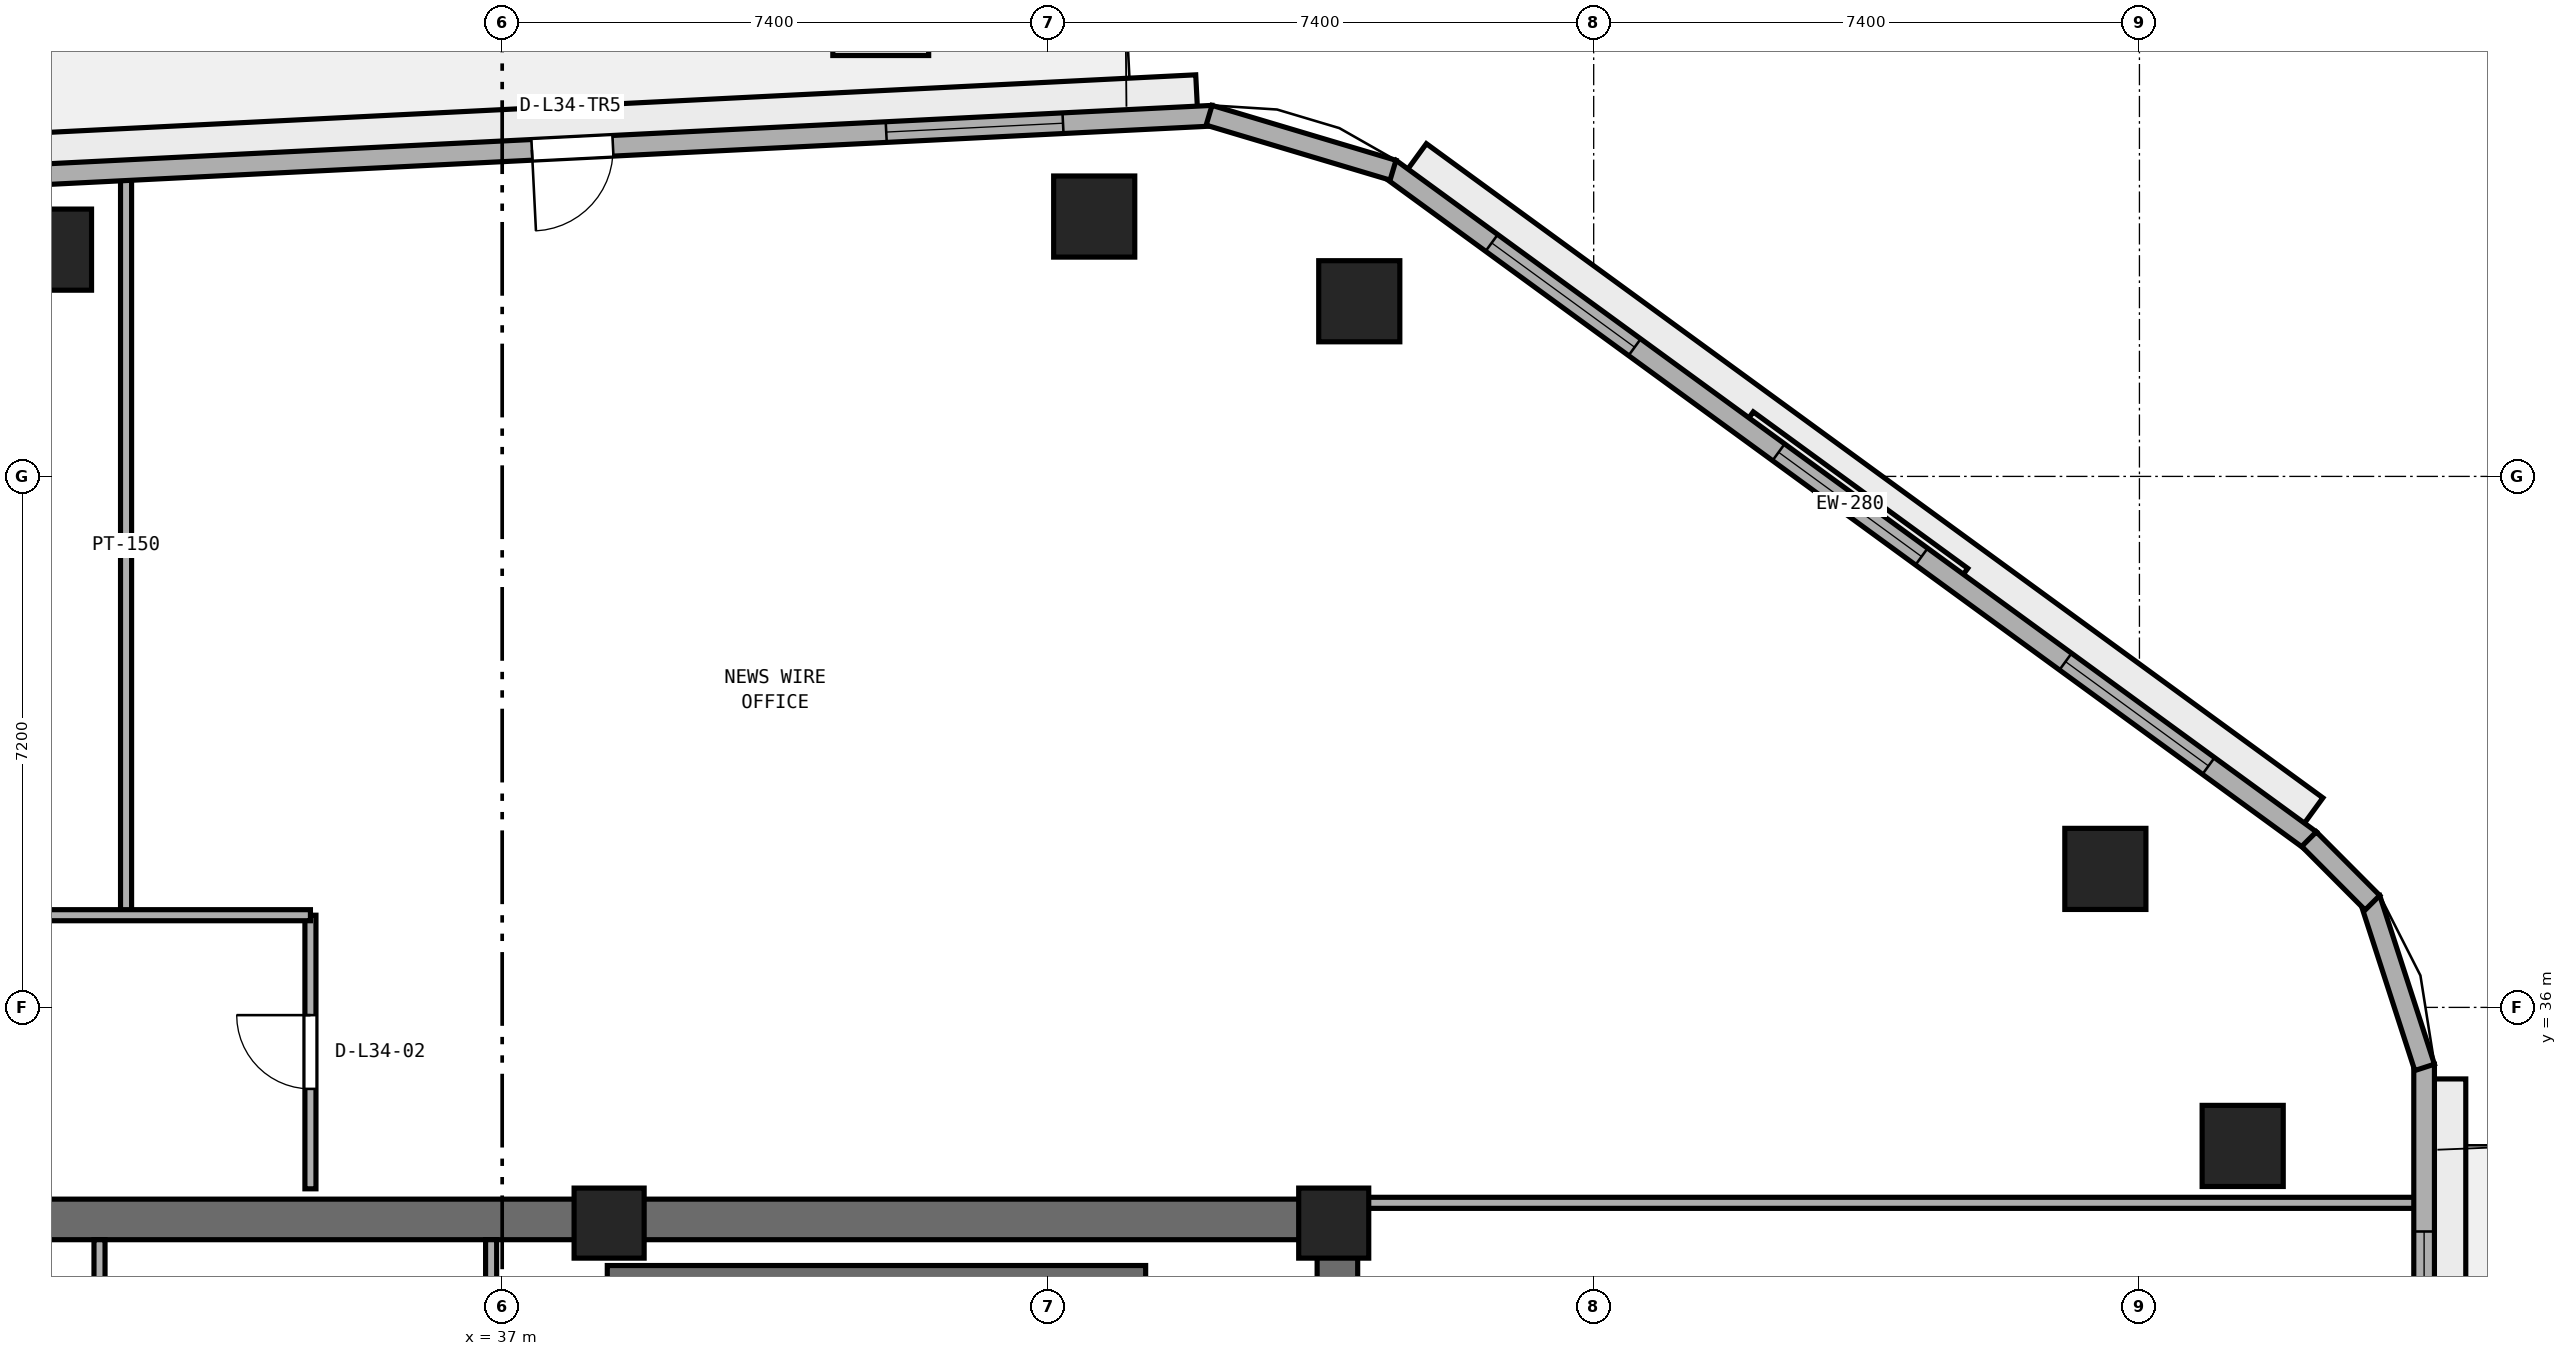
"""IFC4 building model, lengths in metres.
Left out: names, types, materials, properties, quantities, classifications, styles, units other than length and angle.
Written with IfcOpenShell. Run it as: python <this file> out.ifc"""

import sys

from ifc_helpers import new_model, si_unit, direction, frame, frame_2d, origin, origin_2d, place, context, subcontext, project, spatial, rectangle, extrude, element, fill, save


model = new_model("IFC4")
c1 = context("Model", 3, precision=1e-05, world=origin(), true_north=direction((0.0, 1.0)))
c2 = subcontext(c1, "Body", "Model", "MODEL_VIEW")
j1 = project(units=[si_unit("LENGTHUNIT", "METRE"), si_unit("PLANEANGLEUNIT", "RADIAN")], contexts=[c1])
p1 = place(None, origin())
s1 = spatial("IfcSite", under=j1, at=p1, CompositionType="ELEMENT")
p2 = place(p1, origin())
s2 = spatial("IfcBuilding", under=s1, at=p2, CompositionType="ELEMENT")
p3 = place(p2, frame((0.0, 0.0, 136.4)))
s3 = spatial("IfcBuildingStorey", under=s2, at=p3, CompositionType="ELEMENT", Elevation=136.4)
p4 = place(p3, frame((25.4, 33.125, 0.0), z_axis=(0.0, 0.0, 1.0), x_axis=(1.0, 0.0, 0.0)))
e1 = element("IfcWall", 1, at=p4, inside=s3, PredefinedType="SHEAR", context=c2, shape_type="SweptSolid", body=[
    extrude(rectangle(XDim=23.2, YDim=0.55, at=frame_2d((11.6, 0.0))), origin(), (0.0, 0.0, 1.0), 3.54),
])
p5 = place(p3, frame((48.325, 17.55, 0.0), z_axis=(0.0, 0.0, 1.0), x_axis=(0.0, 1.0, 0.0)))
e2 = element("IfcWall", 2, at=p5, inside=s3, PredefinedType="SHEAR", context=c2, shape_type="SweptSolid", body=[
    extrude(rectangle(XDim=15.3, YDim=0.55, at=frame_2d((7.65, 0.0))), origin(), (0.0, 0.0, 1.0), 3.54),
])
p6 = place(p5, frame((5.75, 0.0, 0.0)))
e3 = element("IfcOpeningElement", 3, at=p6, cuts=e2, PredefinedType="OPENING", context=c2, shape_type="SweptSolid", body=[
    extrude(rectangle(XDim=1.5, YDim=2.15, at=frame_2d((0.75, 1.075))), frame((0.0, 0.285, 0.0), z_axis=(0.0, -1.0, 0.0), x_axis=(1.0, 0.0, 0.0)), (0.0, 0.0, 1.0), 0.57),
])
for number, where, z_axis, x_axis in (
    (4, (48.275, 33.075, 0.0), (0.0, 0.0, 1.0), (1.0, 0.0, 0.0)),
    (5, (38.45, 33.075, 0.0), (0.0, 0.0, 1.0), (1.0, 0.0, 0.0)),
):
    element("IfcColumn", number, at=place(p3, frame(where, z_axis=z_axis, x_axis=x_axis)), inside=s3, PredefinedType="PILASTER", context=c2, shape_type="SweptSolid", body=[
        extrude(rectangle(XDim=0.95, YDim=0.95, at=origin_2d()), origin(), (0.0, 0.0, 1.0), 3.8),
    ])
for number, where, z_axis, x_axis in (
    (6, (60.6, 34.122, 0.0), (0.0, 0.0, 1.0), (1.0, 0.0, 0.0)),
    (7, (58.738, 37.878, 0.0), (0.0, 0.0, 1.0), (1.0, 0.0, 0.0)),
    (8, (48.622, 45.575, 0.0), (0.0, 0.0, 1.0), (1.0, 0.0, 0.0)),
    (9, (45.028, 46.724, 0.0), (0.0, 0.0, 1.0), (1.0, 0.0, 0.0)),
    (10, (30.882, 46.275, 0.0), (0.0, 0.0, 1.0), (1.0, 0.0, 0.0)),
):
    element("IfcColumn", number, at=place(p3, frame(where, z_axis=z_axis, x_axis=x_axis)), inside=s3, PredefinedType="COLUMN", context=c2, shape_type="SweptSolid", body=[
        extrude(rectangle(XDim=1.1, YDim=1.1, at=origin_2d()), origin(), (0.0, 0.0, 1.0), 3.8),
    ])
p7 = place(p3, frame((38.425, 32.375, 0.0), z_axis=(0.0, 0.0, 1.0), x_axis=(1.0, 0.0, 0.0)))
e11 = element("IfcWall", 11, at=p7, inside=s3, PredefinedType="SHEAR", context=c2, shape_type="SweptSolid", body=[
    extrude(rectangle(XDim=7.3, YDim=0.25, at=frame_2d((3.65, 0.0))), origin(), (0.0, 0.0, 1.0), 3.54),
])
for number, where, z_axis, x_axis in (
    (12, (31.54, 30.65, 0.0), (0.0, 0.0, 1.0), (0.0, 1.0, 0.0)),
    (13, (36.85, 30.65, 0.0), (0.0, 0.0, 1.0), (0.0, 1.0, 0.0)),
):
    element("IfcWall", number, at=place(p3, frame(where, z_axis=z_axis, x_axis=x_axis)), inside=s3, PredefinedType="PARTITIONING", context=c2, shape_type="SweptSolid", body=[
        extrude(rectangle(XDim=2.2, YDim=0.15, at=frame_2d((1.1, 0.0))), origin(), (0.0, 0.0, 1.0), 3.54),
    ])
p8 = place(p3, frame((34.4, 33.54, 0.0), z_axis=(0.0, 0.0, 1.0), x_axis=(0.0, 1.0, 0.0)))
e14 = element("IfcWall", 14, at=p8, inside=s3, PredefinedType="PARTITIONING", context=c2, shape_type="SweptSolid", body=[
    extrude(rectangle(XDim=3.71, YDim=0.15, at=frame_2d((1.855, 0.0))), origin(), (0.0, 0.0, 1.0), 3.54),
])
p9 = place(p8, frame((1.355, 0.0, 0.0)))
e15 = element("IfcOpeningElement", 15, at=p9, cuts=e14, PredefinedType="OPENING", context=c2, shape_type="SweptSolid", body=[
    extrude(rectangle(XDim=1.0, YDim=2.12, at=frame_2d((0.5, 1.06))), frame((0.0, 0.085, 0.0), z_axis=(0.0, -1.0, 0.0), x_axis=(1.0, 0.0, 0.0)), (0.0, 0.0, 1.0), 0.17),
])
p10 = place(p3, frame((31.9, 37.25, 0.0), z_axis=(0.0, 0.0, 1.0), x_axis=(0.0, 1.0, 0.0)))
e16 = element("IfcWall", 16, at=p10, inside=s3, PredefinedType="PARTITIONING", context=c2, shape_type="SweptSolid", body=[
    extrude(rectangle(XDim=10.037, YDim=0.15, at=frame_2d((5.019, 0.0))), origin(), (0.0, 0.0, 1.0), 3.54),
])
p11 = place(p3, frame((48.74, 33.35, 0.0), z_axis=(0.0, 0.0, 1.0), x_axis=(1.0, 0.0, 0.0)))
e17 = element("IfcWall", 17, at=p11, inside=s3, PredefinedType="PARTITIONING", context=c2, shape_type="SweptSolid", body=[
    extrude(rectangle(XDim=14.255, YDim=0.15, at=frame_2d((7.127, 0.0))), origin(), (0.0, 0.0, 1.0), 2.923),
])
p12 = place(p3, frame((21.55, 37.25, 0.0), z_axis=(0.0, 0.0, 1.0), x_axis=(1.0, 0.0, 0.0)))
e18 = element("IfcWall", 18, at=p12, inside=s3, PredefinedType="PARTITIONING", context=c2, shape_type="SweptSolid", body=[
    extrude(rectangle(XDim=12.85, YDim=0.15, at=frame_2d((6.425, 0.0))), origin(), (0.0, 0.0, 1.0), 3.54),
])
p13 = place(p12, frame((4.795, 0.0, 0.0)))
e19 = element("IfcOpeningElement", 19, at=p13, cuts=e18, PredefinedType="OPENING", context=c2, shape_type="SweptSolid", body=[
    extrude(rectangle(XDim=1.0, YDim=2.12, at=frame_2d((0.5, 1.06))), frame((0.0, 0.085, 0.0), z_axis=(0.0, -1.0, 0.0), x_axis=(1.0, 0.0, 0.0)), (0.0, 0.0, 1.0), 0.17),
])
p14 = place(p3, frame((63.06, 16.418, 0.0), z_axis=(0.0, 0.0, 1.0), x_axis=(0.0, 1.0, 0.0)))
e20 = element("IfcWall", 20, at=p14, inside=s3, PredefinedType="STANDARD", context=c2, shape_type="SweptSolid", body=[
    extrude(rectangle(XDim=18.812, YDim=0.28, at=frame_2d((9.406, 0.0))), origin(), (0.0, 0.0, 1.0), 3.54),
])
p15 = place(p14, frame((8.556, 0.0, 0.0)))
e21 = element("IfcOpeningElement", 21, at=p15, cuts=e20, PredefinedType="OPENING", context=c2, shape_type="SweptSolid", body=[
    extrude(rectangle(XDim=1.1, YDim=2.2, at=frame_2d((0.55, 1.1))), frame((0.0, 0.15, 0.0), z_axis=(0.0, -1.0, 0.0), x_axis=(1.0, 0.0, 0.0)), (0.0, 0.0, 1.0), 0.3),
])
p16 = place(p14, frame((2.019, 0.0, 0.9)))
e22 = element("IfcOpeningElement", 22, at=p16, cuts=e20, PredefinedType="OPENING", context=c2, shape_type="SweptSolid", body=[
    extrude(rectangle(XDim=2.4, YDim=1.75, at=frame_2d((1.2, 0.875))), frame((0.0, 0.15, 0.0), z_axis=(0.0, -1.0, 0.0), x_axis=(1.0, 0.0, 0.0)), (0.0, 0.0, 1.0), 0.3),
])
p17 = place(p14, frame((14.143, 0.0, 0.9)))
e23 = element("IfcOpeningElement", 23, at=p17, cuts=e20, PredefinedType="OPENING", context=c2, shape_type="SweptSolid", body=[
    extrude(rectangle(XDim=2.4, YDim=1.75, at=frame_2d((1.2, 0.875))), frame((0.0, 0.15, 0.0), z_axis=(0.0, -1.0, 0.0), x_axis=(1.0, 0.0, 0.0)), (0.0, 0.0, 1.0), 0.3),
])
p18 = place(p3, frame((61.516, 38.267, 0.0), z_axis=(0.0, 0.0, 1.0), x_axis=(-0.807812505785, 0.589439526582, 0.0)))
e24 = element("IfcWall", 24, at=p18, inside=s3, PredefinedType="STANDARD", context=c2, shape_type="SweptSolid", body=[
    extrude(rectangle(XDim=15.448, YDim=0.28, at=frame_2d((7.724, 0.0))), origin(), (0.0, 0.0, 1.0), 3.54),
])
p19 = place(p18, frame((1.708, 0.0, 0.9)))
e25 = element("IfcOpeningElement", 25, at=p19, cuts=e24, PredefinedType="OPENING", context=c2, shape_type="SweptSolid", body=[
    extrude(rectangle(XDim=2.4, YDim=1.75, at=frame_2d((1.2, 0.875))), frame((0.0, 0.15, 0.0), z_axis=(0.0, -1.0, 0.0), x_axis=(1.0, 0.0, 0.0)), (0.0, 0.0, 1.0), 0.3),
])
p20 = place(p18, frame((6.524, 0.0, 0.9)))
e26 = element("IfcOpeningElement", 26, at=p20, cuts=e24, PredefinedType="OPENING", context=c2, shape_type="SweptSolid", body=[
    extrude(rectangle(XDim=2.4, YDim=1.75, at=frame_2d((1.2, 0.875))), frame((0.0, 0.15, 0.0), z_axis=(0.0, -1.0, 0.0), x_axis=(1.0, 0.0, 0.0)), (0.0, 0.0, 1.0), 0.3),
])
p21 = place(p18, frame((11.34, 0.0, 0.9)))
e27 = element("IfcOpeningElement", 27, at=p21, cuts=e24, PredefinedType="OPENING", context=c2, shape_type="SweptSolid", body=[
    extrude(rectangle(XDim=2.4, YDim=1.75, at=frame_2d((1.2, 0.875))), frame((0.0, 0.15, 0.0), z_axis=(0.0, -1.0, 0.0), x_axis=(1.0, 0.0, 0.0)), (0.0, 0.0, 1.0), 0.3),
])
p22 = place(p3, frame((46.632, 48.091, 0.0), z_axis=(0.0, 0.0, 1.0), x_axis=(-0.998744129094, -0.050101542886, 0.0)))
e28 = element("IfcWall", 28, at=p22, inside=s3, PredefinedType="STANDARD", context=c2, shape_type="SweptSolid", body=[
    extrude(rectangle(XDim=17.382, YDim=0.28, at=frame_2d((8.691, 0.0))), origin(), (0.0, 0.0, 1.0), 3.54),
])
p23 = place(p22, frame((8.141, 0.0, 0.0)))
e29 = element("IfcOpeningElement", 29, at=p23, cuts=e28, PredefinedType="OPENING", context=c2, shape_type="SweptSolid", body=[
    extrude(rectangle(XDim=1.1, YDim=2.2, at=frame_2d((0.55, 1.1))), frame((0.0, 0.15, 0.0), z_axis=(0.0, -1.0, 0.0), x_axis=(1.0, 0.0, 0.0)), (0.0, 0.0, 1.0), 0.3),
])
p24 = place(p22, frame((2.03, 0.0, 0.9)))
e30 = element("IfcOpeningElement", 30, at=p24, cuts=e28, PredefinedType="OPENING", context=c2, shape_type="SweptSolid", body=[
    extrude(rectangle(XDim=2.4, YDim=1.75, at=frame_2d((1.2, 0.875))), frame((0.0, 0.15, 0.0), z_axis=(0.0, -1.0, 0.0), x_axis=(1.0, 0.0, 0.0)), (0.0, 0.0, 1.0), 0.3),
])
p25 = place(p3, frame((63.067, 35.187, 0.0), z_axis=(0.0, 0.0, 1.0), x_axis=(-0.308390504294, 0.951259847182, 0.0)))
e31 = element("IfcWall", 31, at=p25, inside=s3, PredefinedType="STANDARD", context=c2, shape_type="SweptSolid", body=[
    extrude(rectangle(XDim=2.405, YDim=0.28, at=frame_2d((1.203, 0.0))), origin(), (0.0, 0.0, 1.0), 3.54),
])
p26 = place(p3, frame((62.359, 37.419, 0.0), z_axis=(0.0, 0.0, 1.0), x_axis=(-0.706003104649, 0.708208737751, 0.0)))
e32 = element("IfcWall", 32, at=p26, inside=s3, PredefinedType="STANDARD", context=c2, shape_type="SweptSolid", body=[
    extrude(rectangle(XDim=1.218, YDim=0.28, at=frame_2d((0.609, 0.0))), origin(), (0.0, 0.0, 1.0), 3.54),
])
p27 = place(p3, frame((49.079, 47.352, 0.0), z_axis=(0.0, 0.0, 1.0), x_axis=(-0.958207501709, 0.286074087726, 0.0)))
e33 = element("IfcWall", 33, at=p27, inside=s3, PredefinedType="STANDARD", context=c2, shape_type="SweptSolid", body=[
    extrude(rectangle(XDim=2.603, YDim=0.28, at=frame_2d((1.302, 0.0))), origin(), (0.0, 0.0, 1.0), 3.54),
])
p28 = place(p9, origin())
e34 = element("IfcDoor", 34, at=p28, inside=s3, OperationType="SINGLE_SWING_RIGHT", PredefinedType="DOOR", context=c2, shape_type="SweptSolid", body=[
    extrude(rectangle(XDim=1.0, YDim=2.12, at=frame_2d((0.5, 1.06))), frame((0.0, 0.025, 0.0), z_axis=(0.0, -1.0, 0.0), x_axis=(1.0, 0.0, 0.0)), (0.0, 0.0, 1.0), 0.05),
])
fill(e15, e34)
p29 = place(p17, origin())
e35 = element("IfcWindow", 35, at=p29, inside=s3, PartitioningType="SINGLE_PANEL", PredefinedType="WINDOW", context=c2, shape_type="SweptSolid", body=[
    extrude(rectangle(XDim=2.4, YDim=1.75, at=frame_2d((1.2, 0.875))), frame((0.0, 0.03, 0.0), z_axis=(0.0, -1.0, 0.0), x_axis=(1.0, 0.0, 0.0)), (0.0, 0.0, 1.0), 0.06),
])
fill(e23, e35)
p30 = place(p19, origin())
e36 = element("IfcWindow", 36, at=p30, inside=s3, PartitioningType="SINGLE_PANEL", PredefinedType="WINDOW", context=c2, shape_type="SweptSolid", body=[
    extrude(rectangle(XDim=2.4, YDim=1.75, at=frame_2d((1.2, 0.875))), frame((0.0, 0.03, 0.0), z_axis=(0.0, -1.0, 0.0), x_axis=(1.0, 0.0, 0.0)), (0.0, 0.0, 1.0), 0.06),
])
fill(e25, e36)
p31 = place(p20, origin())
e37 = element("IfcWindow", 37, at=p31, inside=s3, PartitioningType="SINGLE_PANEL", PredefinedType="WINDOW", context=c2, shape_type="SweptSolid", body=[
    extrude(rectangle(XDim=2.4, YDim=1.75, at=frame_2d((1.2, 0.875))), frame((0.0, 0.03, 0.0), z_axis=(0.0, -1.0, 0.0), x_axis=(1.0, 0.0, 0.0)), (0.0, 0.0, 1.0), 0.06),
])
fill(e26, e37)
p32 = place(p21, origin())
e38 = element("IfcWindow", 38, at=p32, inside=s3, PartitioningType="SINGLE_PANEL", PredefinedType="WINDOW", context=c2, shape_type="SweptSolid", body=[
    extrude(rectangle(XDim=2.4, YDim=1.75, at=frame_2d((1.2, 0.875))), frame((0.0, 0.03, 0.0), z_axis=(0.0, -1.0, 0.0), x_axis=(1.0, 0.0, 0.0)), (0.0, 0.0, 1.0), 0.06),
])
fill(e27, e38)
p33 = place(p23, origin())
e39 = element("IfcDoor", 39, at=p33, inside=s3, OperationType="SINGLE_SWING_RIGHT", PredefinedType="DOOR", context=c2, shape_type="SweptSolid", body=[
    extrude(rectangle(XDim=1.1, YDim=2.2, at=frame_2d((0.55, 1.1))), frame((0.0, 0.025, 0.0), z_axis=(0.0, -1.0, 0.0), x_axis=(1.0, 0.0, 0.0)), (0.0, 0.0, 1.0), 0.05),
])
fill(e29, e39)
p34 = place(p24, origin())
e40 = element("IfcWindow", 40, at=p34, inside=s3, PartitioningType="SINGLE_PANEL", PredefinedType="WINDOW", context=c2, shape_type="SweptSolid", body=[
    extrude(rectangle(XDim=2.4, YDim=1.75, at=frame_2d((1.2, 0.875))), frame((0.0, 0.03, 0.0), z_axis=(0.0, -1.0, 0.0), x_axis=(1.0, 0.0, 0.0)), (0.0, 0.0, 1.0), 0.06),
])
fill(e30, e40)
save(model, sys.argv[1])
